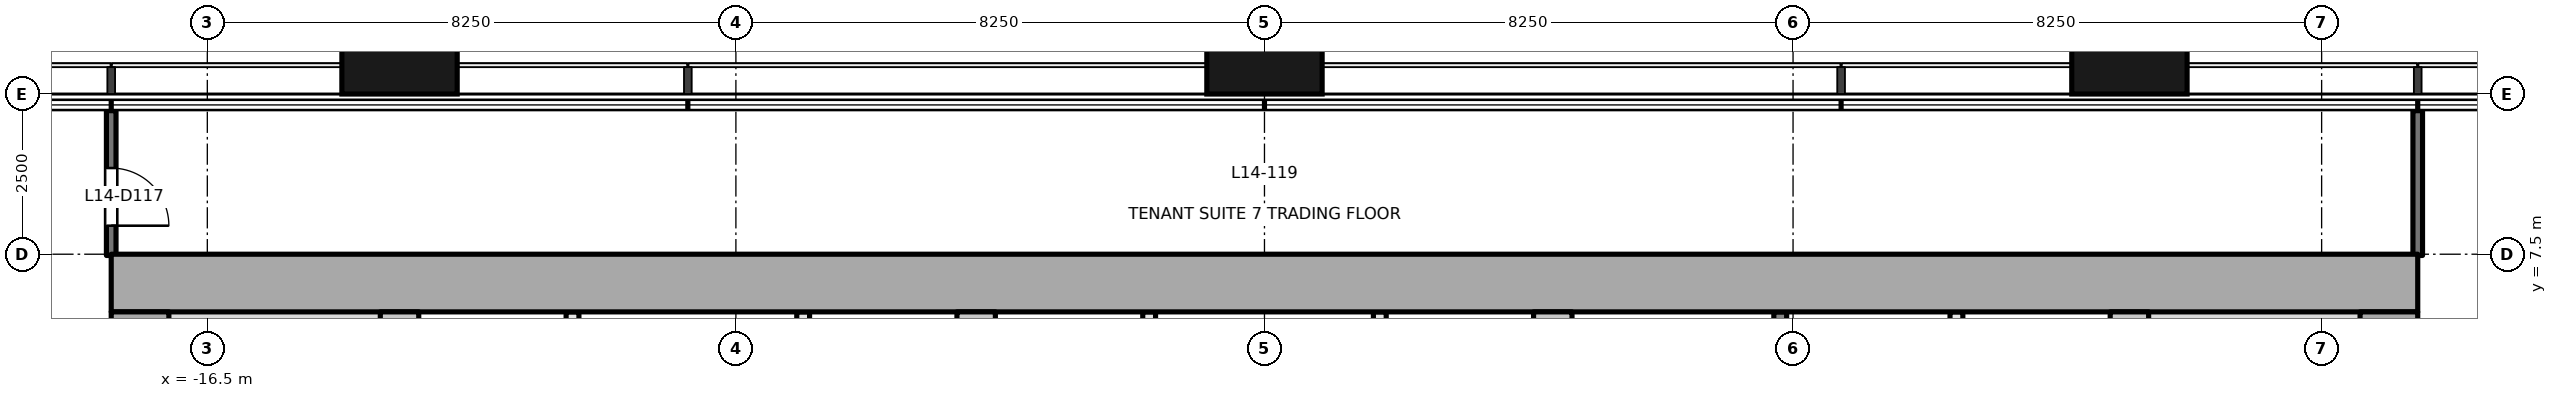
"""IFC4 building model, lengths in metres.
Left out: names, types, materials, properties, quantities, classifications, styles, units other than length and angle.
Written with IfcOpenShell. Run it as: python <this file> out.ifc"""

import sys

from ifc_helpers import new_model, si_unit, direction, frame, frame_2d, origin, origin_2d, place, context, subcontext, project, spatial, rectangle, extrude, element, fill, save


model = new_model("IFC4")
c1 = context("Model", 3, precision=1e-05, world=origin(), true_north=direction((0.0, 1.0)))
c2 = subcontext(c1, "Body", "Model", "MODEL_VIEW")
j1 = project(units=[si_unit("LENGTHUNIT", "METRE"), si_unit("PLANEANGLEUNIT", "RADIAN")], contexts=[c1])
p1 = place(None, origin())
s1 = spatial("IfcSite", under=j1, at=p1, CompositionType="ELEMENT")
p2 = place(p1, origin())
s2 = spatial("IfcBuilding", under=s1, at=p2, CompositionType="ELEMENT")
p3 = place(p2, frame((0.0, 0.0, 65.2)))
s3 = spatial("IfcBuildingStorey", under=s2, at=p3, CompositionType="ELEMENT", Elevation=65.2)
for number, where, z_axis, x_axis in (
    (1, (-13.5, 10.9, -0.2), (0.0, 0.0, 1.0), (1.0, 0.0, 0.0)),
    (2, (0.0, 10.9, -0.2), (0.0, 0.0, 1.0), (1.0, 0.0, 0.0)),
    (3, (13.5, 10.9, -0.2), (0.0, 0.0, 1.0), (1.0, 0.0, 0.0)),
):
    element("IfcColumn", number, at=place(p3, frame(where, z_axis=z_axis, x_axis=x_axis)), inside=s3, PredefinedType="COLUMN", context=c2, shape_type="SweptSolid", body=[
        extrude(rectangle(XDim=1.8, YDim=1.8, at=origin_2d()), origin(), (0.0, 0.0, 1.0), 4.1),
    ])
p4 = place(p3, frame((-18.0, 7.05, -0.2), z_axis=(0.0, 0.0, 1.0), x_axis=(1.0, 0.0, 0.0)))
e4 = element("IfcWall", 4, at=p4, inside=s3, PredefinedType="SHEAR", context=c2, shape_type="SweptSolid", body=[
    extrude(rectangle(XDim=36.0, YDim=0.9, at=frame_2d((18.0, 0.0))), origin(), (0.0, 0.0, 1.0), 4.1),
])
p5 = place(p3, frame((-17.55, -6.6, -0.2), z_axis=(0.0, 0.0, 1.0), x_axis=(0.0, 1.0, 0.0)))
e5 = element("IfcWall", 5, at=p5, inside=s3, PredefinedType="SHEAR", context=c2, shape_type="SweptSolid", body=[
    extrude(rectangle(XDim=13.2, YDim=0.9, at=frame_2d((6.6, 0.0))), origin(), (0.0, 0.0, 1.0), 4.1),
])
p6 = place(p5, frame((4.55, 0.0, 0.2)))
e6 = element("IfcOpeningElement", 6, at=p6, cuts=e5, PredefinedType="OPENING", context=c2, shape_type="SweptSolid", body=[
    extrude(rectangle(XDim=1.2, YDim=2.1, at=frame_2d((0.6, 1.05))), frame((0.0, 0.46, 0.0), z_axis=(0.0, -1.0, 0.0), x_axis=(1.0, 0.0, 0.0)), (0.0, 0.0, 1.0), 0.921),
])
p7 = place(p3, frame((17.55, -6.6, -0.2), z_axis=(0.0, 0.0, 1.0), x_axis=(0.0, 1.0, 0.0)))
e7 = element("IfcWall", 7, at=p7, inside=s3, PredefinedType="SHEAR", context=c2, shape_type="SweptSolid", body=[
    extrude(rectangle(XDim=13.2, YDim=0.9, at=frame_2d((6.6, 0.0))), origin(), (0.0, 0.0, 1.0), 4.1),
])
p8 = place(p7, frame((4.55, 0.0, 0.2)))
e8 = element("IfcOpeningElement", 8, at=p8, cuts=e7, PredefinedType="OPENING", context=c2, shape_type="SweptSolid", body=[
    extrude(rectangle(XDim=1.2, YDim=2.1, at=frame_2d((0.6, 1.05))), frame((0.0, 0.46, 0.0), z_axis=(0.0, -1.0, 0.0), x_axis=(1.0, 0.0, 0.0)), (0.0, 0.0, 1.0), 0.921),
])
for number, where, z_axis, x_axis in (
    (9, (-13.5, -6.6, -0.2), (0.0, 0.0, 1.0), (0.0, 1.0, 0.0)),
    (10, (-4.5, -6.6, -0.2), (0.0, 0.0, 1.0), (0.0, 1.0, 0.0)),
    (11, (4.5, -6.6, -0.2), (0.0, 0.0, 1.0), (0.0, 1.0, 0.0)),
    (12, (13.5, -6.6, -0.2), (0.0, 0.0, 1.0), (0.0, 1.0, 0.0)),
):
    element("IfcWall", number, at=place(p3, frame(where, z_axis=z_axis, x_axis=x_axis)), inside=s3, PredefinedType="SHEAR", context=c2, shape_type="SweptSolid", body=[
        extrude(rectangle(XDim=13.2, YDim=0.6, at=frame_2d((6.6, 0.0))), origin(), (0.0, 0.0, 1.0), 4.1),
    ])
p9 = place(p3, frame((-10.8, -6.6, 0.0), z_axis=(0.0, 0.0, 1.0), x_axis=(0.0, 1.0, 0.0)))
e13 = element("IfcWall", 13, at=p9, inside=s3, PredefinedType="PARTITIONING", context=c2, shape_type="SweptSolid", body=[
    extrude(rectangle(XDim=13.2, YDim=0.2, at=frame_2d((6.6, 0.0))), origin(), (0.0, 0.0, 1.0), 3.9),
])
p10 = place(p9, frame((0.55, 0.0, 0.0)))
e14 = element("IfcOpeningElement", 14, at=p10, cuts=e13, PredefinedType="OPENING", context=c2, shape_type="SweptSolid", body=[
    extrude(rectangle(XDim=0.9, YDim=2.1, at=frame_2d((0.45, 1.05))), frame((0.0, 0.111, 0.0), z_axis=(0.0, -1.0, 0.0), x_axis=(1.0, 0.0, 0.0)), (0.0, 0.0, 1.0), 0.221),
])
p11 = place(p9, frame((2.9, 0.0, 0.0)))
e15 = element("IfcOpeningElement", 15, at=p11, cuts=e13, PredefinedType="OPENING", context=c2, shape_type="SweptSolid", body=[
    extrude(rectangle(XDim=1.2, YDim=2.1, at=frame_2d((0.6, 1.05))), frame((0.0, 0.111, 0.0), z_axis=(0.0, -1.0, 0.0), x_axis=(1.0, 0.0, 0.0)), (0.0, 0.0, 1.0), 0.221),
])
p12 = place(p9, frame((5.7, 0.0, 0.0)))
e16 = element("IfcOpeningElement", 16, at=p12, cuts=e13, PredefinedType="OPENING", context=c2, shape_type="SweptSolid", body=[
    extrude(rectangle(XDim=1.2, YDim=2.1, at=frame_2d((0.6, 1.05))), frame((0.0, 0.111, 0.0), z_axis=(0.0, -1.0, 0.0), x_axis=(1.0, 0.0, 0.0)), (0.0, 0.0, 1.0), 0.221),
])
p13 = place(p9, frame((8.5, 0.0, 0.0)))
e17 = element("IfcOpeningElement", 17, at=p13, cuts=e13, PredefinedType="OPENING", context=c2, shape_type="SweptSolid", body=[
    extrude(rectangle(XDim=1.2, YDim=2.1, at=frame_2d((0.6, 1.05))), frame((0.0, 0.111, 0.0), z_axis=(0.0, -1.0, 0.0), x_axis=(1.0, 0.0, 0.0)), (0.0, 0.0, 1.0), 0.221),
])
p14 = place(p9, frame((11.3, 0.0, 0.0)))
e18 = element("IfcOpeningElement", 18, at=p14, cuts=e13, PredefinedType="OPENING", context=c2, shape_type="SweptSolid", body=[
    extrude(rectangle(XDim=1.2, YDim=2.1, at=frame_2d((0.6, 1.05))), frame((0.0, 0.111, 0.0), z_axis=(0.0, -1.0, 0.0), x_axis=(1.0, 0.0, 0.0)), (0.0, 0.0, 1.0), 0.221),
])
p15 = place(p3, frame((-7.2, -6.6, 0.0), z_axis=(0.0, 0.0, 1.0), x_axis=(0.0, 1.0, 0.0)))
e19 = element("IfcWall", 19, at=p15, inside=s3, PredefinedType="PARTITIONING", context=c2, shape_type="SweptSolid", body=[
    extrude(rectangle(XDim=13.2, YDim=0.2, at=frame_2d((6.6, 0.0))), origin(), (0.0, 0.0, 1.0), 3.9),
])
p16 = place(p15, frame((0.55, 0.0, 0.0)))
e20 = element("IfcOpeningElement", 20, at=p16, cuts=e19, PredefinedType="OPENING", context=c2, shape_type="SweptSolid", body=[
    extrude(rectangle(XDim=0.9, YDim=2.1, at=frame_2d((0.45, 1.05))), frame((0.0, 0.111, 0.0), z_axis=(0.0, -1.0, 0.0), x_axis=(1.0, 0.0, 0.0)), (0.0, 0.0, 1.0), 0.221),
])
p17 = place(p15, frame((2.9, 0.0, 0.0)))
e21 = element("IfcOpeningElement", 21, at=p17, cuts=e19, PredefinedType="OPENING", context=c2, shape_type="SweptSolid", body=[
    extrude(rectangle(XDim=1.2, YDim=2.1, at=frame_2d((0.6, 1.05))), frame((0.0, 0.111, 0.0), z_axis=(0.0, -1.0, 0.0), x_axis=(1.0, 0.0, 0.0)), (0.0, 0.0, 1.0), 0.221),
])
p18 = place(p15, frame((5.7, 0.0, 0.0)))
e22 = element("IfcOpeningElement", 22, at=p18, cuts=e19, PredefinedType="OPENING", context=c2, shape_type="SweptSolid", body=[
    extrude(rectangle(XDim=1.2, YDim=2.1, at=frame_2d((0.6, 1.05))), frame((0.0, 0.111, 0.0), z_axis=(0.0, -1.0, 0.0), x_axis=(1.0, 0.0, 0.0)), (0.0, 0.0, 1.0), 0.221),
])
p19 = place(p15, frame((8.5, 0.0, 0.0)))
e23 = element("IfcOpeningElement", 23, at=p19, cuts=e19, PredefinedType="OPENING", context=c2, shape_type="SweptSolid", body=[
    extrude(rectangle(XDim=1.2, YDim=2.1, at=frame_2d((0.6, 1.05))), frame((0.0, 0.111, 0.0), z_axis=(0.0, -1.0, 0.0), x_axis=(1.0, 0.0, 0.0)), (0.0, 0.0, 1.0), 0.221),
])
p20 = place(p15, frame((11.3, 0.0, 0.0)))
e24 = element("IfcOpeningElement", 24, at=p20, cuts=e19, PredefinedType="OPENING", context=c2, shape_type="SweptSolid", body=[
    extrude(rectangle(XDim=1.2, YDim=2.1, at=frame_2d((0.6, 1.05))), frame((0.0, 0.111, 0.0), z_axis=(0.0, -1.0, 0.0), x_axis=(1.0, 0.0, 0.0)), (0.0, 0.0, 1.0), 0.221),
])
p21 = place(p3, frame((-1.8, -6.6, 0.0), z_axis=(0.0, 0.0, 1.0), x_axis=(0.0, 1.0, 0.0)))
e25 = element("IfcWall", 25, at=p21, inside=s3, PredefinedType="PARTITIONING", context=c2, shape_type="SweptSolid", body=[
    extrude(rectangle(XDim=13.2, YDim=0.2, at=frame_2d((6.6, 0.0))), origin(), (0.0, 0.0, 1.0), 3.9),
])
p22 = place(p21, frame((0.55, 0.0, 0.0)))
e26 = element("IfcOpeningElement", 26, at=p22, cuts=e25, PredefinedType="OPENING", context=c2, shape_type="SweptSolid", body=[
    extrude(rectangle(XDim=0.9, YDim=2.1, at=frame_2d((0.45, 1.05))), frame((0.0, 0.111, 0.0), z_axis=(0.0, -1.0, 0.0), x_axis=(1.0, 0.0, 0.0)), (0.0, 0.0, 1.0), 0.221),
])
p23 = place(p3, frame((1.8, -6.6, 0.0), z_axis=(0.0, 0.0, 1.0), x_axis=(0.0, 1.0, 0.0)))
e27 = element("IfcWall", 27, at=p23, inside=s3, PredefinedType="PARTITIONING", context=c2, shape_type="SweptSolid", body=[
    extrude(rectangle(XDim=13.2, YDim=0.2, at=frame_2d((6.6, 0.0))), origin(), (0.0, 0.0, 1.0), 3.9),
])
p24 = place(p23, frame((0.55, 0.0, 0.0)))
e28 = element("IfcOpeningElement", 28, at=p24, cuts=e27, PredefinedType="OPENING", context=c2, shape_type="SweptSolid", body=[
    extrude(rectangle(XDim=0.9, YDim=2.1, at=frame_2d((0.45, 1.05))), frame((0.0, 0.111, 0.0), z_axis=(0.0, -1.0, 0.0), x_axis=(1.0, 0.0, 0.0)), (0.0, 0.0, 1.0), 0.221),
])
p25 = place(p3, frame((8.05, -6.6, 0.0), z_axis=(0.0, 0.0, 1.0), x_axis=(0.0, 1.0, 0.0)))
e29 = element("IfcWall", 29, at=p25, inside=s3, PredefinedType="PARTITIONING", context=c2, shape_type="SweptSolid", body=[
    extrude(rectangle(XDim=13.2, YDim=0.2, at=frame_2d((6.6, 0.0))), origin(), (0.0, 0.0, 1.0), 3.9),
])
p26 = place(p25, frame((0.298, 0.0, 0.0)))
e30 = element("IfcOpeningElement", 30, at=p26, cuts=e29, PredefinedType="OPENING", context=c2, shape_type="SweptSolid", body=[
    extrude(rectangle(XDim=0.9, YDim=2.1, at=frame_2d((0.45, 1.05))), frame((0.0, 0.111, 0.0), z_axis=(0.0, -1.0, 0.0), x_axis=(1.0, 0.0, 0.0)), (0.0, 0.0, 1.0), 0.221),
])
p27 = place(p25, frame((2.066, 0.0, 0.0)))
e31 = element("IfcOpeningElement", 31, at=p27, cuts=e29, PredefinedType="OPENING", context=c2, shape_type="SweptSolid", body=[
    extrude(rectangle(XDim=0.9, YDim=2.1, at=frame_2d((0.45, 1.05))), frame((0.0, 0.111, 0.0), z_axis=(0.0, -1.0, 0.0), x_axis=(1.0, 0.0, 0.0)), (0.0, 0.0, 1.0), 0.221),
])
p28 = place(p25, frame((3.834, 0.0, 0.0)))
e32 = element("IfcOpeningElement", 32, at=p28, cuts=e29, PredefinedType="OPENING", context=c2, shape_type="SweptSolid", body=[
    extrude(rectangle(XDim=0.9, YDim=2.1, at=frame_2d((0.45, 1.05))), frame((0.0, 0.111, 0.0), z_axis=(0.0, -1.0, 0.0), x_axis=(1.0, 0.0, 0.0)), (0.0, 0.0, 1.0), 0.221),
])
p29 = place(p25, frame((5.466, 0.0, 0.0)))
e33 = element("IfcOpeningElement", 33, at=p29, cuts=e29, PredefinedType="OPENING", context=c2, shape_type="SweptSolid", body=[
    extrude(rectangle(XDim=0.9, YDim=2.1, at=frame_2d((0.45, 1.05))), frame((0.0, 0.111, 0.0), z_axis=(0.0, -1.0, 0.0), x_axis=(1.0, 0.0, 0.0)), (0.0, 0.0, 1.0), 0.221),
])
p30 = place(p25, frame((11.9, 0.0, 0.0)))
e34 = element("IfcOpeningElement", 34, at=p30, cuts=e29, PredefinedType="OPENING", context=c2, shape_type="SweptSolid", body=[
    extrude(rectangle(XDim=1.1, YDim=2.1, at=frame_2d((0.55, 1.05))), frame((0.0, 0.111, 0.0), z_axis=(0.0, -1.0, 0.0), x_axis=(1.0, 0.0, 0.0)), (0.0, 0.0, 1.0), 0.221),
])
p31 = place(p3, frame((10.8, -6.6, 0.0), z_axis=(0.0, 0.0, 1.0), x_axis=(0.0, 1.0, 0.0)))
e35 = element("IfcWall", 35, at=p31, inside=s3, PredefinedType="PARTITIONING", context=c2, shape_type="SweptSolid", body=[
    extrude(rectangle(XDim=13.2, YDim=0.2, at=frame_2d((6.6, 0.0))), origin(), (0.0, 0.0, 1.0), 3.9),
])
p32 = place(p31, frame((0.7, 0.0, 0.0)))
e36 = element("IfcOpeningElement", 36, at=p32, cuts=e35, PredefinedType="OPENING", context=c2, shape_type="SweptSolid", body=[
    extrude(rectangle(XDim=1.2, YDim=2.1, at=frame_2d((0.6, 1.05))), frame((0.0, 0.111, 0.0), z_axis=(0.0, -1.0, 0.0), x_axis=(1.0, 0.0, 0.0)), (0.0, 0.0, 1.0), 0.221),
])
p33 = place(p31, frame((8.67, 0.0, 0.0)))
e37 = element("IfcOpeningElement", 37, at=p33, cuts=e35, PredefinedType="OPENING", context=c2, shape_type="SweptSolid", body=[
    extrude(rectangle(XDim=0.9, YDim=2.1, at=frame_2d((0.45, 1.05))), frame((0.0, 0.111, 0.0), z_axis=(0.0, -1.0, 0.0), x_axis=(1.0, 0.0, 0.0)), (0.0, 0.0, 1.0), 0.221),
])
p34 = place(p31, frame((10.11, 0.0, 0.0)))
e38 = element("IfcOpeningElement", 38, at=p34, cuts=e35, PredefinedType="OPENING", context=c2, shape_type="SweptSolid", body=[
    extrude(rectangle(XDim=0.9, YDim=2.1, at=frame_2d((0.45, 1.05))), frame((0.0, 0.111, 0.0), z_axis=(0.0, -1.0, 0.0), x_axis=(1.0, 0.0, 0.0)), (0.0, 0.0, 1.0), 0.221),
])
p35 = place(p31, frame((11.79, 0.0, 0.0)))
e39 = element("IfcOpeningElement", 39, at=p35, cuts=e35, PredefinedType="OPENING", context=c2, shape_type="SweptSolid", body=[
    extrude(rectangle(XDim=0.9, YDim=2.1, at=frame_2d((0.45, 1.05))), frame((0.0, 0.111, 0.0), z_axis=(0.0, -1.0, 0.0), x_axis=(1.0, 0.0, 0.0)), (0.0, 0.0, 1.0), 0.221),
])
p36 = place(p3, frame((-18.0, 9.74, 0.0), z_axis=(0.0, 0.0, 1.0), x_axis=(0.0, -1.0, 0.0)))
e40 = element("IfcWall", 40, at=p36, inside=s3, PredefinedType="PARTITIONING", context=c2, shape_type="SweptSolid", body=[
    extrude(rectangle(XDim=2.26, YDim=0.15, at=frame_2d((1.13, 0.0))), origin(), (0.0, 0.0, 1.0), 2.9),
])
p37 = place(p36, frame((0.895, 0.0, 0.0)))
e41 = element("IfcOpeningElement", 41, at=p37, cuts=e40, PredefinedType="OPENING", context=c2, shape_type="SweptSolid", body=[
    extrude(rectangle(XDim=0.9, YDim=2.1, at=frame_2d((0.45, 1.05))), frame((0.0, 0.085, 0.0), z_axis=(0.0, -1.0, 0.0), x_axis=(1.0, 0.0, 0.0)), (0.0, 0.0, 1.0), 0.171),
])
p38 = place(p3, frame((18.0, 7.48, 0.0), z_axis=(0.0, 0.0, 1.0), x_axis=(0.0, 1.0, 0.0)))
e42 = element("IfcWall", 42, at=p38, inside=s3, PredefinedType="PARTITIONING", context=c2, shape_type="SweptSolid", body=[
    extrude(rectangle(XDim=2.26, YDim=0.15, at=frame_2d((1.13, 0.0))), origin(), (0.0, 0.0, 1.0), 2.9),
])
p39 = place(p37, origin())
e43 = element("IfcDoor", 43, at=p39, inside=s3, OperationType="SINGLE_SWING_RIGHT", PredefinedType="DOOR", context=c2, shape_type="SweptSolid", body=[
    extrude(rectangle(XDim=0.9, YDim=2.1, at=frame_2d((0.45, 1.05))), frame((0.0, 0.025, 0.0), z_axis=(0.0, -1.0, 0.0), x_axis=(1.0, 0.0, 0.0)), (0.0, 0.0, 1.0), 0.05),
])
fill(e41, e43)
save(model, sys.argv[1])
